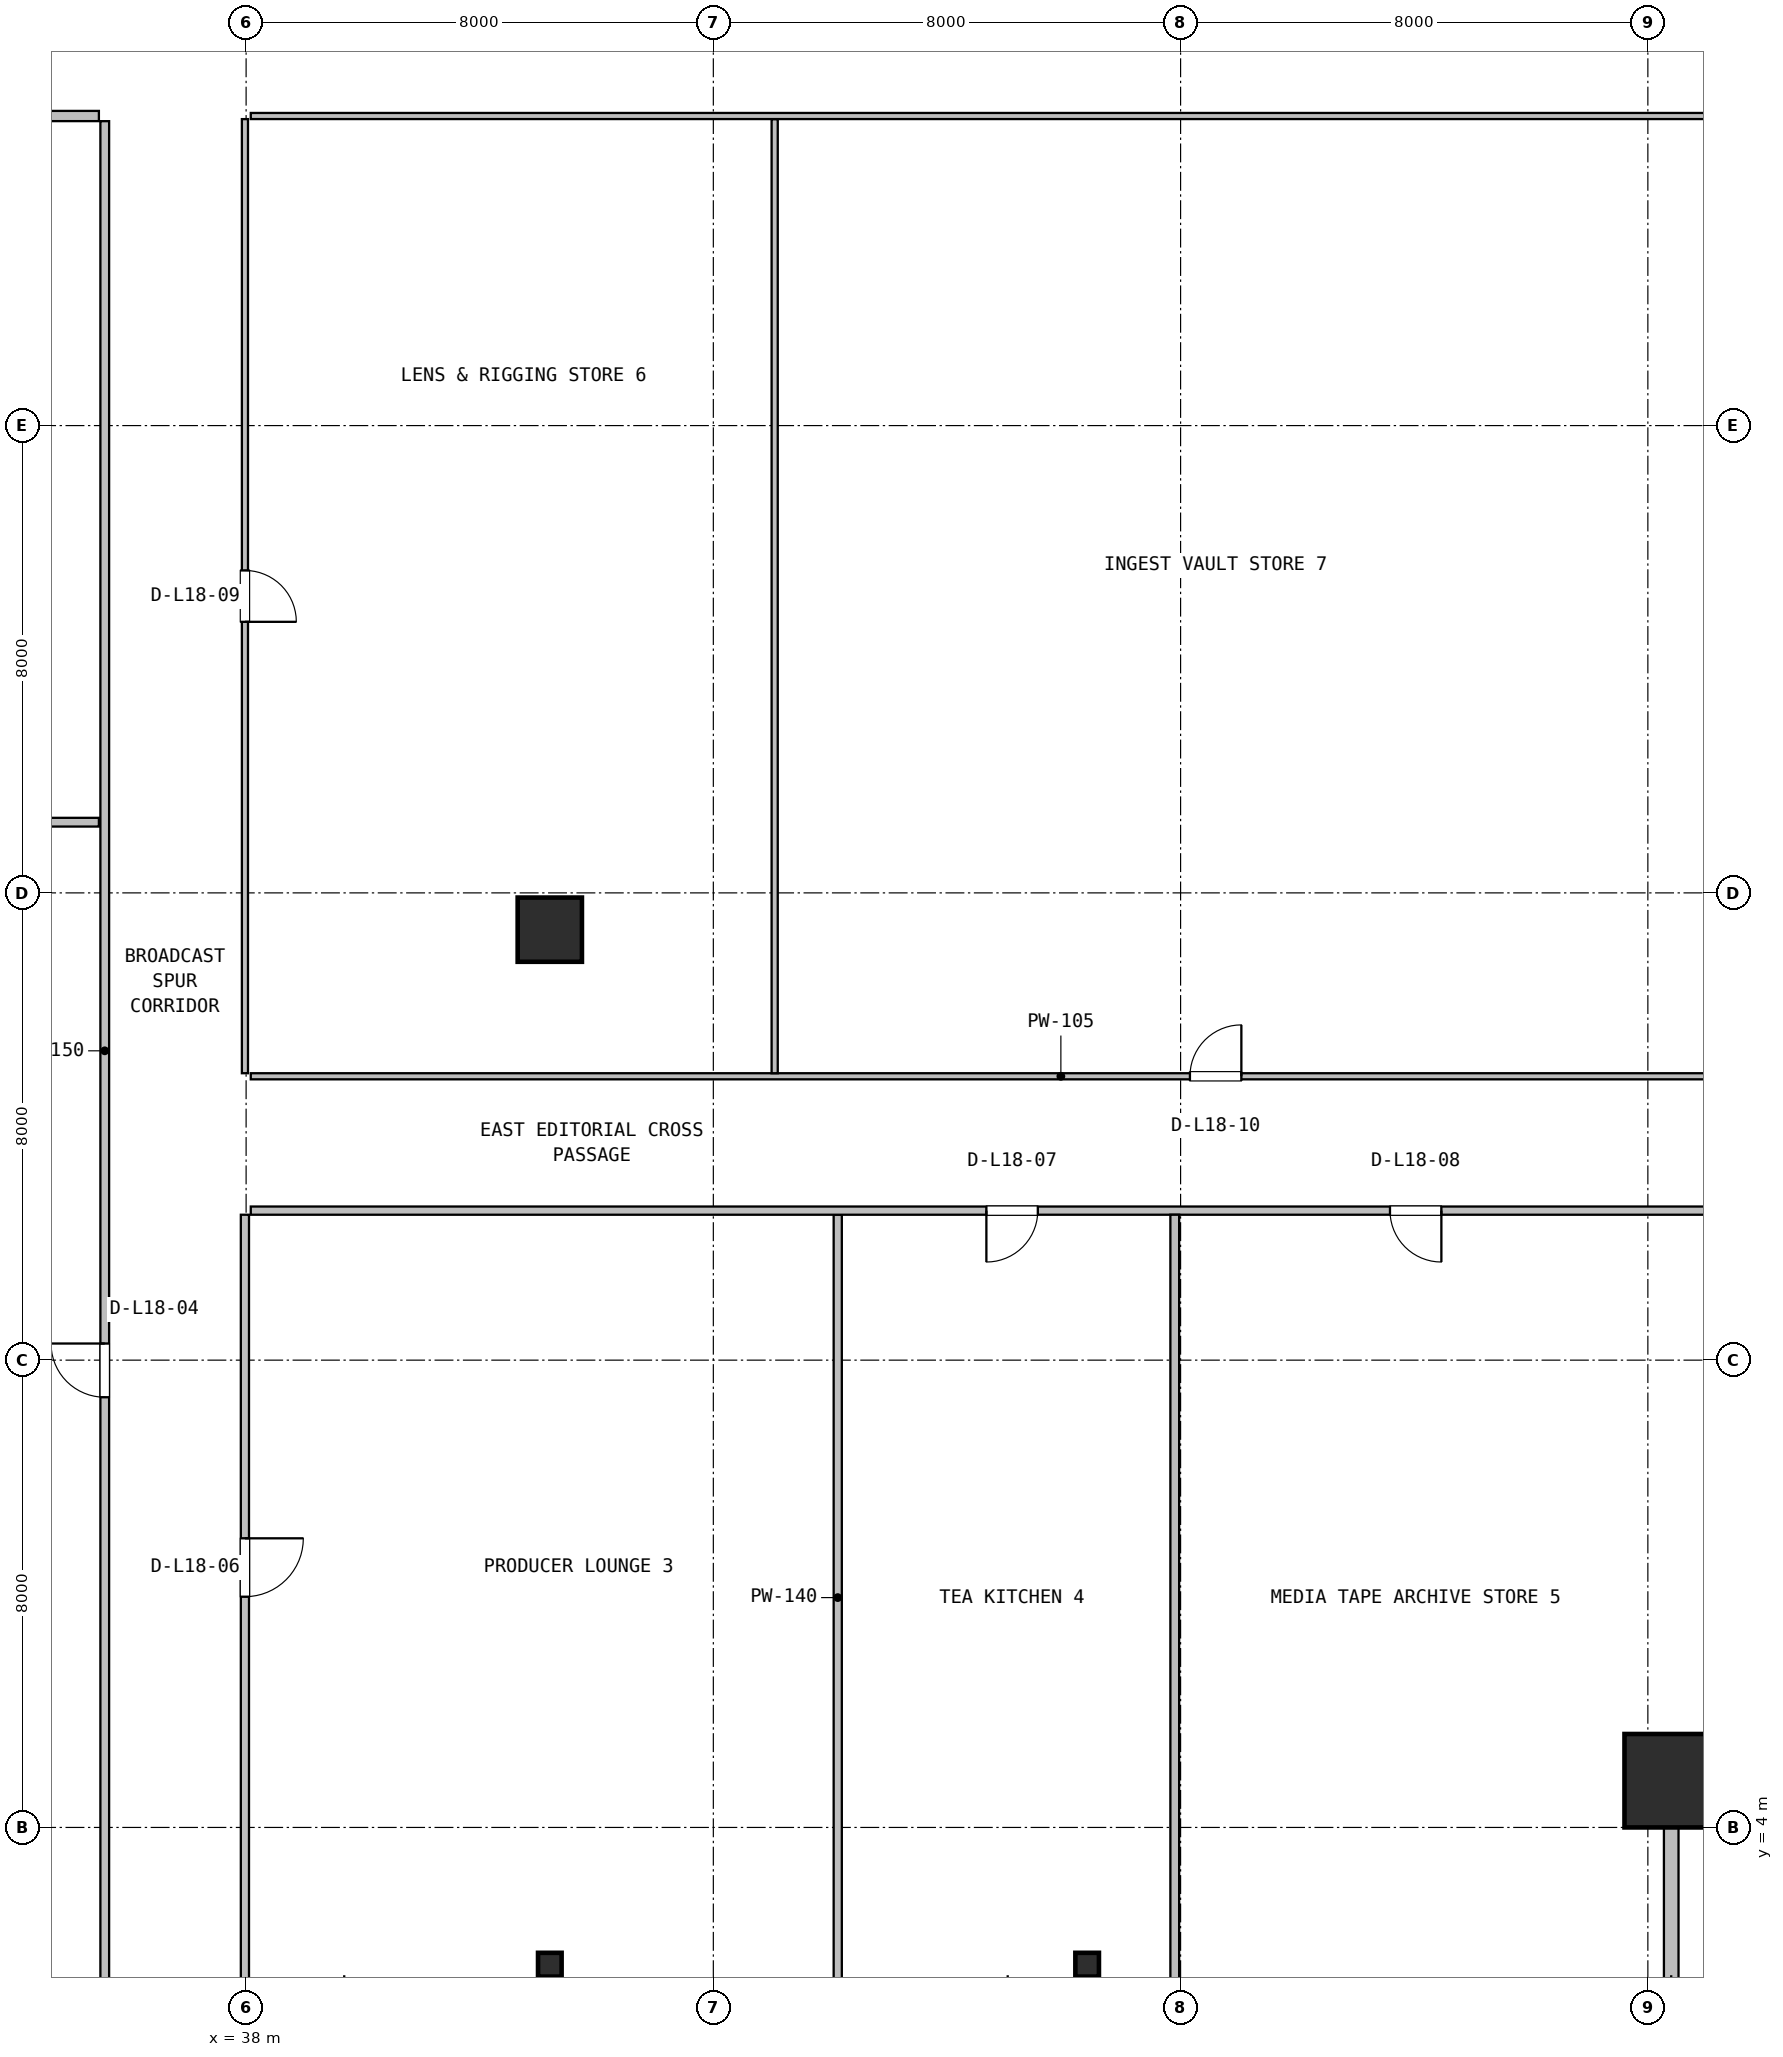
"""IFC4 building model, lengths in metres.
Left out: names, types, materials, properties, quantities, classifications, styles, units other than length and angle.
Written with IfcOpenShell. Run it as: python <this file> out.ifc"""

import sys

from ifc_helpers import new_model, si_unit, direction, frame, frame_2d, origin, origin_2d, place, context, subcontext, project, spatial, rectangle, hollow_rectangle, i_section, extrude, source, transform, mapped, element, fill, save


model = new_model("IFC4")
c1 = context("Model", 3, precision=1e-05, world=origin(), true_north=direction((0.0, 1.0)))
c2 = subcontext(c1, "Body", "Model", "MODEL_VIEW")
j1 = project(units=[si_unit("LENGTHUNIT", "METRE"), si_unit("PLANEANGLEUNIT", "RADIAN")], contexts=[c1])
p1 = place(None, origin())
s1 = spatial("IfcSite", under=j1, at=p1, CompositionType="ELEMENT")
p2 = place(p1, origin())
s2 = spatial("IfcBuilding", under=s1, at=p2, CompositionType="ELEMENT")
p3 = place(p2, frame((0.0, 0.0, 78.3)))
s3 = spatial("IfcBuildingStorey", under=s2, at=p3, CompositionType="ELEMENT", Elevation=78.3)
m1 = source(origin(), c2, "Body", "SweptSolid", [
    extrude(hollow_rectangle(XDim=1.6, YDim=1.6, WallThickness=0.06, at=origin_2d()), origin(), (0.0, 0.0, 1.0), 3.9),
])
p4 = place(p3, frame((62.4, 4.8, 0.0), z_axis=(0.0, 0.0, 1.0), x_axis=(1.0, 0.0, 0.0)))
e1 = element("IfcColumn", 1, at=p4, inside=s3, PredefinedType="COLUMN", context=c2, shape_type="MappedRepresentation", body=[
    mapped(m1, transform((0.0, 0.0, 0.0), x_axis=(1.0, 0.0, 0.0), y_axis=(0.0, 1.0, 0.0), z_axis=(0.0, 0.0, 1.0), scale=1.0)),
])
m2 = source(origin(), c2, "Body", "SweptSolid", [
    extrude(i_section(OverallWidth=0.404, OverallDepth=0.407, WebThickness=0.027, FlangeThickness=0.044, FilletRadius=0.018, at=origin_2d()), origin(), (0.0, 0.0, 1.0), 3.9),
])
for number, where, z_axis, x_axis in (
    (2, (43.2, 1.65, 0.0), (0.0, 0.0, 1.0), (1.0, 0.0, 0.0)),
    (3, (52.4, 1.65, 0.0), (0.0, 0.0, 1.0), (1.0, 0.0, 0.0)),
):
    element("IfcColumn", number, at=place(p3, frame(where, z_axis=z_axis, x_axis=x_axis)), inside=s3, PredefinedType="COLUMN", context=c2, shape_type="MappedRepresentation", body=[
        mapped(m2, transform((0.0, 0.0, 0.0), x_axis=(1.0, 0.0, 0.0), y_axis=(0.0, 1.0, 0.0), z_axis=(0.0, 0.0, 1.0), scale=1.0)),
    ])
m3 = source(origin(), c2, "Body", "SweptSolid", [
    extrude(rectangle(XDim=1.1, YDim=1.1, at=origin_2d()), origin(), (0.0, 0.0, 1.0), 3.9),
])
p5 = place(p3, frame((43.2, 19.37, 0.0), z_axis=(0.0, 0.0, 1.0), x_axis=(1.0, 0.0, 0.0)))
e4 = element("IfcColumn", 4, at=p5, inside=s3, PredefinedType="COLUMN", context=c2, shape_type="MappedRepresentation", body=[
    mapped(m3, transform((0.0, 0.0, 0.0), x_axis=(1.0, 0.0, 0.0), y_axis=(0.0, 1.0, 0.0), z_axis=(0.0, 0.0, 1.0), scale=1.0)),
])
p6 = place(p3, frame((62.4, 1.28, 0.0), z_axis=(0.0, 0.0, 1.0), x_axis=(0.0, 1.0, 0.0)))
e5 = element("IfcWall", 5, at=p6, inside=s3, PredefinedType="SOLIDWALL", context=c2, shape_type="SweptSolid", body=[
    extrude(rectangle(XDim=3.6, YDim=0.25, at=frame_2d((1.8, 0.0))), origin(), (0.0, 0.0, 1.0), 3.138),
])
p7 = place(p3, frame((35.58, 1.38, 0.0), z_axis=(0.0, 0.0, 1.0), x_axis=(0.0, 1.0, 0.0)))
e6 = element("IfcWall", 6, at=p7, inside=s3, PredefinedType="PARTITIONING", context=c2, shape_type="SweptSolid", body=[
    extrude(rectangle(XDim=31.832, YDim=0.15, at=frame_2d((15.916, 0.0))), origin(), (0.0, 0.0, 1.0), 2.782),
])
p8 = place(p7, frame((9.985, 0.0, 0.0)))
e7 = element("IfcOpeningElement", 7, at=p8, cuts=e6, PredefinedType="OPENING", context=c2, shape_type="SweptSolid", body=[
    extrude(rectangle(XDim=0.92, YDim=2.08, at=frame_2d((0.46, 1.04))), frame((0.0, 0.085, 0.0), z_axis=(0.0, -1.0, 0.0), x_axis=(1.0, 0.0, 0.0)), (0.0, 0.0, 1.0), 0.17),
])
p9 = place(p3, frame((2.18, 21.21, 0.0), z_axis=(0.0, 0.0, 1.0), x_axis=(1.0, 0.0, 0.0)))
e8 = element("IfcWall", 8, at=p9, inside=s3, PredefinedType="PARTITIONING", context=c2, shape_type="SweptSolid", body=[
    extrude(rectangle(XDim=33.3, YDim=0.15, at=frame_2d((16.65, 0.0))), origin(), (0.0, 0.0, 1.0), 2.782),
])
p10 = place(p3, frame((2.18, 33.3, 0.0), z_axis=(0.0, 0.0, 1.0), x_axis=(1.0, 0.0, 0.0)))
e9 = element("IfcWall", 9, at=p10, inside=s3, PredefinedType="PARTITIONING", context=c2, shape_type="SweptSolid", body=[
    extrude(rectangle(XDim=33.3, YDim=0.175, at=frame_2d((16.65, 0.0))), origin(), (0.0, 0.0, 1.0), 2.782),
])
p11 = place(p10, frame((18.06, 0.0, 0.0)))
e10 = element("IfcOpeningElement", 10, at=p11, cuts=e9, PredefinedType="OPENING", context=c2, shape_type="SweptSolid", body=[
    extrude(rectangle(XDim=1.05, YDim=2.1, at=frame_2d((0.525, 1.05))), frame((0.0, 0.098, 0.0), z_axis=(0.0, -1.0, 0.0), x_axis=(1.0, 0.0, 0.0)), (0.0, 0.0, 1.0), 0.195),
])
p12 = place(p3, frame((48.13, 1.38, 0.0), z_axis=(0.0, 0.0, 1.0), x_axis=(0.0, 1.0, 0.0)))
e11 = element("IfcWall", 11, at=p12, inside=s3, PredefinedType="PARTITIONING", context=c2, shape_type="SweptSolid", body=[
    extrude(rectangle(XDim=13.11, YDim=0.14, at=frame_2d((6.555, 0.0))), origin(), (0.0, 0.0, 1.0), 3.138),
])
p13 = place(p3, frame((38.08, 14.56, 0.0), z_axis=(0.0, 0.0, 1.0), x_axis=(1.0, 0.0, 0.0)))
e12 = element("IfcWall", 12, at=p13, inside=s3, PredefinedType="PARTITIONING", context=c2, shape_type="SweptSolid", body=[
    extrude(rectangle(XDim=27.74, YDim=0.14, at=frame_2d((13.87, 0.0))), origin(), (0.0, 0.0, 1.0), 2.782),
])
p14 = place(p13, frame((12.595, 0.0, 0.0)))
e13 = element("IfcOpeningElement", 13, at=p14, cuts=e12, PredefinedType="OPENING", context=c2, shape_type="SweptSolid", body=[
    extrude(rectangle(XDim=0.88, YDim=2.06, at=frame_2d((0.44, 1.03))), frame((0.0, 0.08, 0.0), z_axis=(0.0, -1.0, 0.0), x_axis=(1.0, 0.0, 0.0)), (0.0, 0.0, 1.0), 0.16),
])
p15 = place(p13, frame((19.505, 0.0, 0.0)))
e14 = element("IfcOpeningElement", 14, at=p15, cuts=e12, PredefinedType="OPENING", context=c2, shape_type="SweptSolid", body=[
    extrude(rectangle(XDim=0.88, YDim=2.06, at=frame_2d((0.44, 1.03))), frame((0.0, 0.08, 0.0), z_axis=(0.0, -1.0, 0.0), x_axis=(1.0, 0.0, 0.0)), (0.0, 0.0, 1.0), 0.16),
])
p16 = place(p3, frame((37.98, 1.38, 0.0), z_axis=(0.0, 0.0, 1.0), x_axis=(0.0, 1.0, 0.0)))
e15 = element("IfcWall", 15, at=p16, inside=s3, PredefinedType="PARTITIONING", context=c2, shape_type="SweptSolid", body=[
    extrude(rectangle(XDim=13.11, YDim=0.14, at=frame_2d((6.555, 0.0))), origin(), (0.0, 0.0, 1.0), 3.138),
])
p17 = place(p16, frame((6.57, 0.0, 0.0)))
e16 = element("IfcOpeningElement", 16, at=p17, cuts=e15, PredefinedType="OPENING", context=c2, shape_type="SweptSolid", body=[
    extrude(rectangle(XDim=1.0, YDim=2.1, at=frame_2d((0.5, 1.05))), frame((0.0, 0.08, 0.0), z_axis=(0.0, -1.0, 0.0), x_axis=(1.0, 0.0, 0.0)), (0.0, 0.0, 1.0), 0.16),
])
p18 = place(p3, frame((53.9, 1.38, 0.0), z_axis=(0.0, 0.0, 1.0), x_axis=(0.0, 1.0, 0.0)))
e17 = element("IfcWall", 17, at=p18, inside=s3, PredefinedType="PARTITIONING", context=c2, shape_type="SweptSolid", body=[
    extrude(rectangle(XDim=13.11, YDim=0.15, at=frame_2d((6.555, 0.0))), origin(), (0.0, 0.0, 1.0), 3.138),
])
p19 = place(p3, frame((38.08, 16.86, 0.0), z_axis=(0.0, 0.0, 1.0), x_axis=(1.0, 0.0, 0.0)))
e18 = element("IfcWall", 18, at=p19, inside=s3, PredefinedType="PARTITIONING", context=c2, shape_type="SweptSolid", body=[
    extrude(rectangle(XDim=27.74, YDim=0.105, at=frame_2d((13.87, 0.0))), origin(), (0.0, 0.0, 1.0), 2.782),
])
p20 = place(p19, frame((16.08, 0.0, 0.0)))
e19 = element("IfcOpeningElement", 19, at=p20, cuts=e18, PredefinedType="OPENING", context=c2, shape_type="SweptSolid", body=[
    extrude(rectangle(XDim=0.88, YDim=2.06, at=frame_2d((0.44, 1.03))), frame((0.0, 0.062, 0.0), z_axis=(0.0, -1.0, 0.0), x_axis=(1.0, 0.0, 0.0)), (0.0, 0.0, 1.0), 0.125),
])
p21 = place(p3, frame((47.05, 16.912, 0.0), z_axis=(0.0, 0.0, 1.0), x_axis=(0.0, 1.0, 0.0)))
e20 = element("IfcWall", 20, at=p21, inside=s3, PredefinedType="PARTITIONING", context=c2, shape_type="SweptSolid", body=[
    extrude(rectangle(XDim=16.335, YDim=0.105, at=frame_2d((8.167, 0.0))), origin(), (0.0, 0.0, 1.0), 3.252),
])
p22 = place(p3, frame((38.08, 33.3, 0.0), z_axis=(0.0, 0.0, 1.0), x_axis=(1.0, 0.0, 0.0)))
e21 = element("IfcWall", 21, at=p22, inside=s3, PredefinedType="PARTITIONING", context=c2, shape_type="SweptSolid", body=[
    extrude(rectangle(XDim=27.74, YDim=0.105, at=frame_2d((13.87, 0.0))), origin(), (0.0, 0.0, 1.0), 2.782),
])
p23 = place(p3, frame((37.98, 16.912, 0.0), z_axis=(0.0, 0.0, 1.0), x_axis=(0.0, 1.0, 0.0)))
e22 = element("IfcWall", 22, at=p23, inside=s3, PredefinedType="PARTITIONING", context=c2, shape_type="SweptSolid", body=[
    extrude(rectangle(XDim=16.335, YDim=0.105, at=frame_2d((8.167, 0.0))), origin(), (0.0, 0.0, 1.0), 2.782),
])
p24 = place(p23, frame((7.728, 0.0, 0.0)))
e23 = element("IfcOpeningElement", 23, at=p24, cuts=e22, PredefinedType="OPENING", context=c2, shape_type="SweptSolid", body=[
    extrude(rectangle(XDim=0.88, YDim=2.06, at=frame_2d((0.44, 1.03))), frame((0.0, 0.062, 0.0), z_axis=(0.0, -1.0, 0.0), x_axis=(1.0, 0.0, 0.0)), (0.0, 0.0, 1.0), 0.125),
])
m4 = source(origin(), c2, "Body", "SweptSolid", [
    extrude(rectangle(XDim=0.92, YDim=2.08, at=frame_2d((0.46, 1.04))), frame((0.0, 0.025, 0.0), z_axis=(0.0, -1.0, 0.0), x_axis=(1.0, 0.0, 0.0)), (0.0, 0.0, 1.0), 0.05),
])
p25 = place(p8, origin())
e24 = element("IfcDoor", 24, at=p25, inside=s3, OperationType="SINGLE_SWING_RIGHT", PredefinedType="DOOR", context=c2, shape_type="MappedRepresentation", body=[
    mapped(m4, transform((0.0, 0.0, 0.0), x_axis=(1.0, 0.0, 0.0), y_axis=(0.0, 1.0, 0.0), z_axis=(0.0, 0.0, 1.0), scale=1.0)),
])
fill(e7, e24)
m5 = source(origin(), c2, "Body", "SweptSolid", [
    extrude(rectangle(XDim=1.0, YDim=2.1, at=frame_2d((0.5, 1.05))), frame((0.0, 0.025, 0.0), z_axis=(0.0, -1.0, 0.0), x_axis=(1.0, 0.0, 0.0)), (0.0, 0.0, 1.0), 0.05),
])
p26 = place(p17, frame((1.0, 0.0, 0.0), z_axis=(0.0, 0.0, 1.0), x_axis=(-1.0, 0.0, 0.0)))
e25 = element("IfcDoor", 25, at=p26, inside=s3, OperationType="SINGLE_SWING_RIGHT", PredefinedType="DOOR", context=c2, shape_type="MappedRepresentation", body=[
    mapped(m5, transform((0.0, 0.0, 0.0), x_axis=(1.0, 0.0, 0.0), y_axis=(0.0, 1.0, 0.0), z_axis=(0.0, 0.0, 1.0), scale=1.0)),
])
fill(e16, e25)
m6 = source(origin(), c2, "Body", "SweptSolid", [
    extrude(rectangle(XDim=0.88, YDim=2.06, at=frame_2d((0.44, 1.03))), frame((0.0, 0.025, 0.0), z_axis=(0.0, -1.0, 0.0), x_axis=(1.0, 0.0, 0.0)), (0.0, 0.0, 1.0), 0.05),
])
p27 = place(p14, frame((0.88, 0.0, 0.0), z_axis=(0.0, 0.0, 1.0), x_axis=(-1.0, 0.0, 0.0)))
e26 = element("IfcDoor", 26, at=p27, inside=s3, OperationType="SINGLE_SWING_LEFT", PredefinedType="DOOR", context=c2, shape_type="MappedRepresentation", body=[
    mapped(m6, transform((0.0, 0.0, 0.0), x_axis=(1.0, 0.0, 0.0), y_axis=(0.0, 1.0, 0.0), z_axis=(0.0, 0.0, 1.0), scale=1.0)),
])
fill(e13, e26)
p28 = place(p15, frame((0.88, 0.0, 0.0), z_axis=(0.0, 0.0, 1.0), x_axis=(-1.0, 0.0, 0.0)))
e27 = element("IfcDoor", 27, at=p28, inside=s3, OperationType="SINGLE_SWING_RIGHT", PredefinedType="DOOR", context=c2, shape_type="MappedRepresentation", body=[
    mapped(m6, transform((0.0, 0.0, 0.0), x_axis=(1.0, 0.0, 0.0), y_axis=(0.0, 1.0, 0.0), z_axis=(0.0, 0.0, 1.0), scale=1.0)),
])
fill(e14, e27)
p29 = place(p24, frame((0.88, 0.0, 0.0), z_axis=(0.0, 0.0, 1.0), x_axis=(-1.0, 0.0, 0.0)))
e28 = element("IfcDoor", 28, at=p29, inside=s3, OperationType="SINGLE_SWING_LEFT", PredefinedType="DOOR", context=c2, shape_type="MappedRepresentation", body=[
    mapped(m6, transform((0.0, 0.0, 0.0), x_axis=(1.0, 0.0, 0.0), y_axis=(0.0, 1.0, 0.0), z_axis=(0.0, 0.0, 1.0), scale=1.0)),
])
fill(e23, e28)
p30 = place(p20, origin())
e29 = element("IfcDoor", 29, at=p30, inside=s3, OperationType="SINGLE_SWING_RIGHT", PredefinedType="DOOR", context=c2, shape_type="MappedRepresentation", body=[
    mapped(m6, transform((0.0, 0.0, 0.0), x_axis=(1.0, 0.0, 0.0), y_axis=(0.0, 1.0, 0.0), z_axis=(0.0, 0.0, 1.0), scale=1.0)),
])
fill(e19, e29)
save(model, sys.argv[1])
